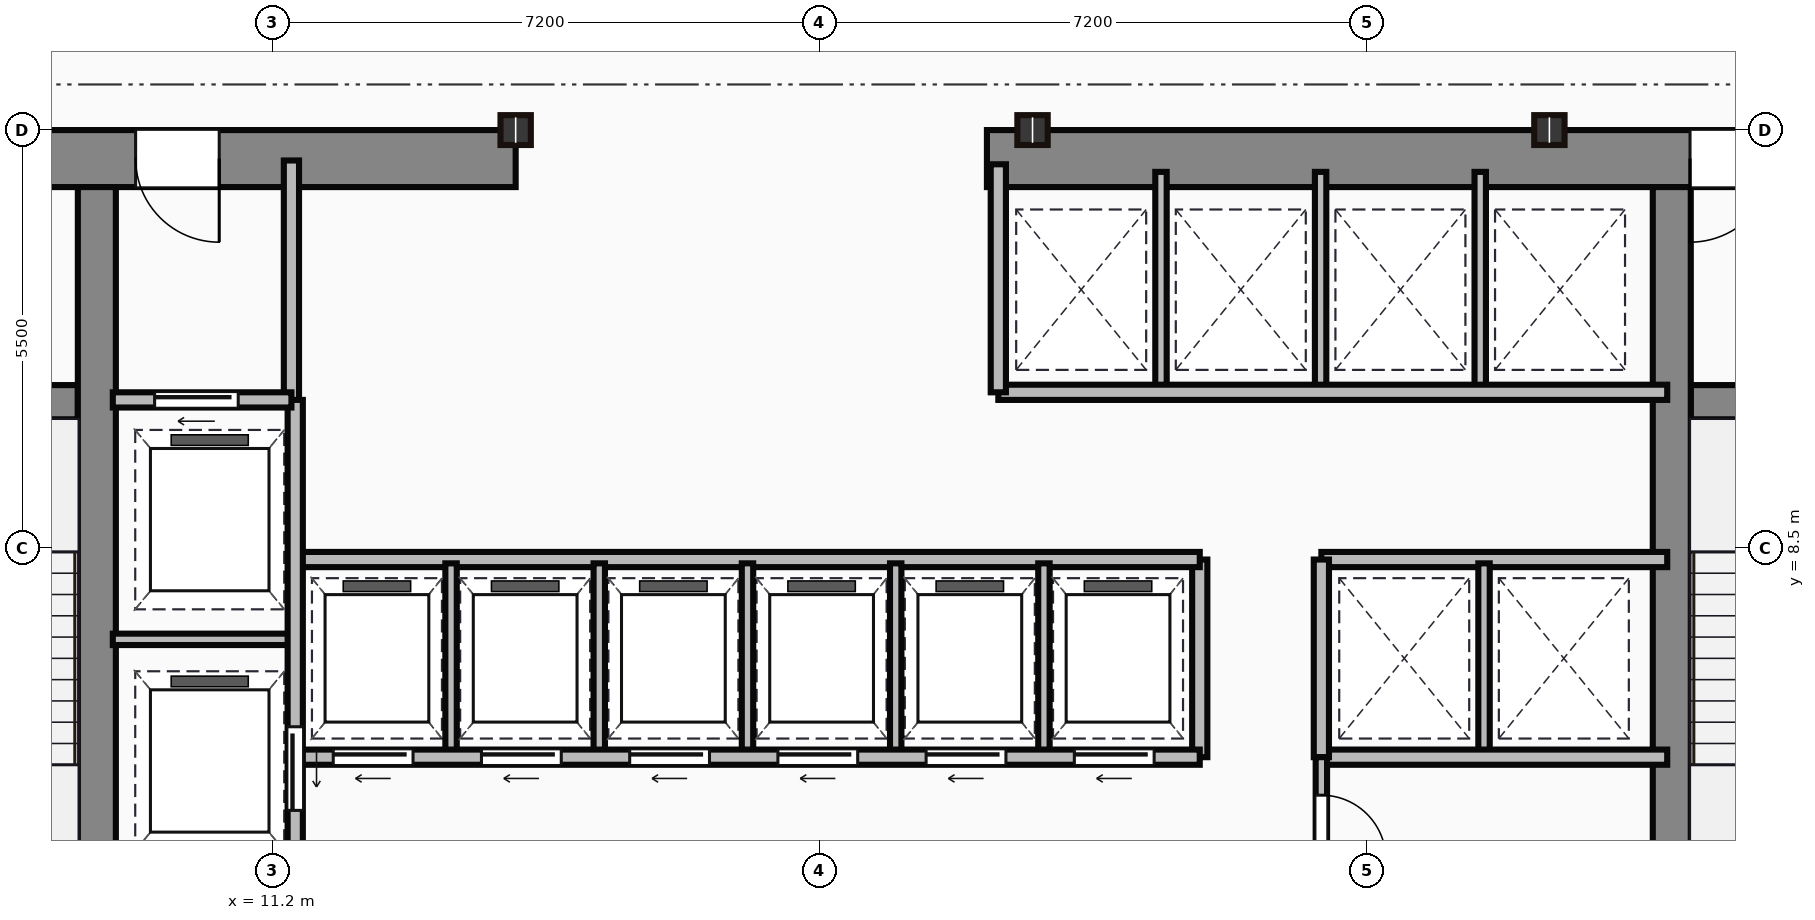
"""IFC4 building model, lengths in metres.
Left out: names, types, materials, properties, quantities, classifications, styles, units other than length and angle.
Written with IfcOpenShell. Run it as: python <this file> out.ifc"""

import sys

from ifc_helpers import new_model, si_unit, direction, frame, frame_2d, origin, origin_2d, place, context, subcontext, project, spatial, rectangle, i_section, extrude, source, transform, mapped, element, fill, save


model = new_model("IFC4")
c1 = context("Model", 3, precision=1e-05, world=origin(), true_north=direction((0.0, 1.0)))
c2 = subcontext(c1, "Body", "Model", "MODEL_VIEW")
j1 = project(units=[si_unit("LENGTHUNIT", "METRE"), si_unit("PLANEANGLEUNIT", "RADIAN")], contexts=[c1])
p1 = place(None, origin())
s1 = spatial("IfcSite", under=j1, at=p1, CompositionType="ELEMENT")
p2 = place(p1, origin())
s2 = spatial("IfcBuilding", under=s1, at=p2, CompositionType="ELEMENT")
p3 = place(p2, frame((0.0, 0.0, 132.45)))
s3 = spatial("IfcBuildingStorey", under=s2, at=p3, CompositionType="ELEMENT", Elevation=132.45)
m1 = source(origin(), c2, "Body", "SweptSolid", [
    extrude(rectangle(XDim=9.1, YDim=0.75, at=frame_2d((4.55, 0.0))), origin(), (0.0, 0.0, 1.0), 3.65),
])
p4 = place(p3, frame((5.3, 13.625, 0.0), z_axis=(0.0, 0.0, 1.0), x_axis=(1.0, 0.0, 0.0)))
e1 = element("IfcWall", 1, at=p4, inside=s3, PredefinedType="SHEAR", context=c2, shape_type="MappedRepresentation", body=[
    mapped(m1, transform((0.0, 0.0, 0.0))),
])
p5 = place(p4, frame((4.1, 0.0, 0.0)))
e2 = element("IfcOpeningElement", 2, at=p5, cuts=e1, PredefinedType="OPENING", context=c2, shape_type="SweptSolid", body=[
    extrude(rectangle(XDim=1.1, YDim=2.15, at=frame_2d((0.55, 1.075))), frame((0.0, 0.385, 0.0), z_axis=(0.0, -1.0, 0.0), x_axis=(1.0, 0.0, 0.0)), (0.0, 0.0, 1.0), 0.77),
])
m2 = source(origin(), c2, "Body", "SweptSolid", [
    extrude(rectangle(XDim=12.6, YDim=0.75, at=frame_2d((6.3, 0.0))), origin(), (0.0, 0.0, 1.0), 3.65),
])
p6 = place(p3, frame((20.6, 13.625, 0.0), z_axis=(0.0, 0.0, 1.0), x_axis=(1.0, 0.0, 0.0)))
e3 = element("IfcWall", 3, at=p6, inside=s3, PredefinedType="SHEAR", context=c2, shape_type="MappedRepresentation", body=[
    mapped(m2, transform((0.0, 0.0, 0.0))),
])
p7 = place(p6, frame((9.25, 0.0, 0.0)))
e4 = element("IfcOpeningElement", 4, at=p7, cuts=e3, PredefinedType="OPENING", context=c2, shape_type="SweptSolid", body=[
    extrude(rectangle(XDim=1.1, YDim=2.15, at=frame_2d((0.55, 1.075))), frame((0.0, 0.385, 0.0), z_axis=(0.0, -1.0, 0.0), x_axis=(1.0, 0.0, 0.0)), (0.0, 0.0, 1.0), 0.77),
])
m3 = source(origin(), c2, "Body", "SweptSolid", [
    extrude(rectangle(XDim=12.35, YDim=0.5, at=frame_2d((6.175, 0.0))), origin(), (0.0, 0.0, 1.0), 3.65),
])
for number, where, z_axis, x_axis in (
    (5, (8.89, 0.9, 0.0), (0.0, 0.0, 1.0), (0.0, 1.0, 0.0)),
    (6, (29.61, 0.9, 0.0), (0.0, 0.0, 1.0), (0.0, 1.0, 0.0)),
):
    element("IfcWall", number, at=place(p3, frame(where, z_axis=z_axis, x_axis=x_axis)), inside=s3, PredefinedType="SHEAR", context=c2, shape_type="MappedRepresentation", body=[
        mapped(m3, transform((0.0, 0.0, 0.0))),
    ])
m4 = source(origin(), c2, "Body", "SweptSolid", [
    extrude(rectangle(XDim=3.39, YDim=0.45, at=frame_2d((1.695, 0.0))), origin(), (0.0, 0.0, 1.0), 3.65),
])
p8 = place(p3, frame((5.25, 10.42, 0.0), z_axis=(0.0, 0.0, 1.0), x_axis=(1.0, 0.0, 0.0)))
e7 = element("IfcWall", 7, at=p8, inside=s3, PredefinedType="SHEAR", context=c2, shape_type="MappedRepresentation", body=[
    mapped(m4, transform((0.0, 0.0, 0.0))),
])
p9 = place(p8, frame((1.05, 0.0, 0.0)))
e8 = element("IfcOpeningElement", 8, at=p9, cuts=e7, PredefinedType="OPENING", context=c2, shape_type="SweptSolid", body=[
    extrude(rectangle(XDim=1.1, YDim=2.15, at=frame_2d((0.55, 1.075))), frame((0.0, 0.235, 0.0), z_axis=(0.0, -1.0, 0.0), x_axis=(1.0, 0.0, 0.0)), (0.0, 0.0, 1.0), 0.47),
])
p10 = place(p3, frame((29.86, 10.42, 0.0), z_axis=(0.0, 0.0, 1.0), x_axis=(1.0, 0.0, 0.0)))
e9 = element("IfcWall", 9, at=p10, inside=s3, PredefinedType="SHEAR", context=c2, shape_type="MappedRepresentation", body=[
    mapped(m4, transform((0.0, 0.0, 0.0))),
])
p11 = place(p10, frame((1.1, 0.0, 0.0)))
e10 = element("IfcOpeningElement", 10, at=p11, cuts=e9, PredefinedType="OPENING", context=c2, shape_type="SweptSolid", body=[
    extrude(rectangle(XDim=1.1, YDim=2.15, at=frame_2d((0.55, 1.075))), frame((0.0, 0.235, 0.0), z_axis=(0.0, -1.0, 0.0), x_axis=(1.0, 0.0, 0.0)), (0.0, 0.0, 1.0), 0.47),
])
m5 = source(origin(), c2, "Body", "SweptSolid", [
    extrude(i_section(OverallWidth=0.399, OverallDepth=0.393, WebThickness=0.023, FlangeThickness=0.037, at=origin_2d()), origin(), (0.0, 0.0, 1.0), 3.65),
])
for number, where, z_axis, x_axis in (
    (11, (14.4, 14.0, 0.0), (0.0, 0.0, 1.0), (1.0, 0.0, 0.0)),
    (12, (21.2, 14.0, 0.0), (0.0, 0.0, 1.0), (1.0, 0.0, 0.0)),
    (13, (28.0, 14.0, 0.0), (0.0, 0.0, 1.0), (1.0, 0.0, 0.0)),
):
    element("IfcColumn", number, at=place(p3, frame(where, z_axis=z_axis, x_axis=x_axis)), inside=s3, PredefinedType="COLUMN", context=c2, shape_type="MappedRepresentation", body=[
        mapped(m5, transform((0.0, 0.0, 0.0))),
    ])
m6 = source(origin(), c2, "Body", "SweptSolid", [
    extrude(rectangle(XDim=3.18, YDim=0.2, at=frame_2d((1.59, 0.0))), origin(), (0.0, 0.0, 1.0), 3.35),
])
p12 = place(p3, frame((11.45, 10.42, 0.0), z_axis=(0.0, 0.0, 1.0), x_axis=(0.0, 1.0, 0.0)))
e14 = element("IfcWall", 14, at=p12, inside=s3, PredefinedType="PARTITIONING", context=c2, shape_type="MappedRepresentation", body=[
    mapped(m6, transform((0.0, 0.0, 0.0))),
])
m7 = source(origin(), c2, "Body", "SweptSolid", [
    extrude(rectangle(XDim=2.35, YDim=0.2, at=frame_2d((1.175, 0.0))), origin(), (0.0, 0.0, 1.0), 3.35),
])
p13 = place(p3, frame((9.1, 10.45, 0.0), z_axis=(0.0, 0.0, 1.0), x_axis=(1.0, 0.0, 0.0)))
e15 = element("IfcWall", 15, at=p13, inside=s3, PredefinedType="PARTITIONING", context=c2, shape_type="MappedRepresentation", body=[
    mapped(m7, transform((0.0, 0.0, 0.0))),
])
p14 = place(p13, frame((0.55, 0.0, 0.0)))
e16 = element("IfcOpeningElement", 16, at=p14, cuts=e15, PredefinedType="OPENING", context=c2, shape_type="SweptSolid", body=[
    extrude(rectangle(XDim=1.1, YDim=2.15, at=frame_2d((0.55, 1.075))), frame((0.0, 0.11, 0.0), z_axis=(0.0, -1.0, 0.0), x_axis=(1.0, 0.0, 0.0)), (0.0, 0.0, 1.0), 0.22),
])
m8 = source(origin(), c2, "Body", "SweptSolid", [
    extrude(rectangle(XDim=9.6, YDim=0.2, at=frame_2d((4.8, 0.0))), origin(), (0.0, 0.0, 1.0), 3.35),
])
p15 = place(p3, frame((11.5, 0.85, 0.0), z_axis=(0.0, 0.0, 1.0), x_axis=(0.0, 1.0, 0.0)))
e17 = element("IfcWall", 17, at=p15, inside=s3, PredefinedType="PARTITIONING", context=c2, shape_type="MappedRepresentation", body=[
    mapped(m8, transform((0.0, 0.0, 0.0))),
])
p16 = place(p15, frame((4.2, 0.0, 0.0)))
e18 = element("IfcOpeningElement", 18, at=p16, cuts=e17, PredefinedType="OPENING", context=c2, shape_type="SweptSolid", body=[
    extrude(rectangle(XDim=1.1, YDim=2.15, at=frame_2d((0.55, 1.075))), frame((0.0, 0.11, 0.0), z_axis=(0.0, -1.0, 0.0), x_axis=(1.0, 0.0, 0.0)), (0.0, 0.0, 1.0), 0.22),
])
p17 = place(p15, frame((0.9, 0.0, 0.0)))
e19 = element("IfcOpeningElement", 19, at=p17, cuts=e17, PredefinedType="OPENING", context=c2, shape_type="SweptSolid", body=[
    extrude(rectangle(XDim=1.2, YDim=2.15, at=frame_2d((0.6, 1.075))), frame((0.0, 0.11, 0.0), z_axis=(0.0, -1.0, 0.0), x_axis=(1.0, 0.0, 0.0)), (0.0, 0.0, 1.0), 0.22),
])
m9 = source(origin(), c2, "Body", "SweptSolid", [
    extrude(rectangle(XDim=2.4, YDim=0.15, at=frame_2d((1.2, 0.0))), origin(), (0.0, 0.0, 1.0), 3.35),
])
p18 = place(p3, frame((9.1, 7.3, 0.0), z_axis=(0.0, 0.0, 1.0), x_axis=(1.0, 0.0, 0.0)))
e20 = element("IfcWall", 20, at=p18, inside=s3, PredefinedType="PARTITIONING", context=c2, shape_type="MappedRepresentation", body=[
    mapped(m9, transform((0.0, 0.0, 0.0))),
])
m10 = source(origin(), c2, "Body", "SweptSolid", [
    extrude(rectangle(XDim=11.85, YDim=0.2, at=frame_2d((5.925, 0.0))), origin(), (0.0, 0.0, 1.0), 3.35),
])
p19 = place(p3, frame((11.55, 5.75, 0.0), z_axis=(0.0, 0.0, 1.0), x_axis=(1.0, 0.0, 0.0)))
e21 = element("IfcWall", 21, at=p19, inside=s3, PredefinedType="PARTITIONING", context=c2, shape_type="MappedRepresentation", body=[
    mapped(m10, transform((0.0, 0.0, 0.0))),
])
p20 = place(p19, frame((0.45, 0.0, 0.0)))
e22 = element("IfcOpeningElement", 22, at=p20, cuts=e21, PredefinedType="OPENING", context=c2, shape_type="SweptSolid", body=[
    extrude(rectangle(XDim=1.05, YDim=2.15, at=frame_2d((0.525, 1.075))), frame((0.0, 0.11, 0.0), z_axis=(0.0, -1.0, 0.0), x_axis=(1.0, 0.0, 0.0)), (0.0, 0.0, 1.0), 0.22),
])
p21 = place(p19, frame((2.4, 0.0, 0.0)))
e23 = element("IfcOpeningElement", 23, at=p21, cuts=e21, PredefinedType="OPENING", context=c2, shape_type="SweptSolid", body=[
    extrude(rectangle(XDim=1.05, YDim=2.15, at=frame_2d((0.525, 1.075))), frame((0.0, 0.11, 0.0), z_axis=(0.0, -1.0, 0.0), x_axis=(1.0, 0.0, 0.0)), (0.0, 0.0, 1.0), 0.22),
])
p22 = place(p19, frame((4.35, 0.0, 0.0)))
e24 = element("IfcOpeningElement", 24, at=p22, cuts=e21, PredefinedType="OPENING", context=c2, shape_type="SweptSolid", body=[
    extrude(rectangle(XDim=1.05, YDim=2.15, at=frame_2d((0.525, 1.075))), frame((0.0, 0.11, 0.0), z_axis=(0.0, -1.0, 0.0), x_axis=(1.0, 0.0, 0.0)), (0.0, 0.0, 1.0), 0.22),
])
p23 = place(p19, frame((6.3, 0.0, 0.0)))
e25 = element("IfcOpeningElement", 25, at=p23, cuts=e21, PredefinedType="OPENING", context=c2, shape_type="SweptSolid", body=[
    extrude(rectangle(XDim=1.05, YDim=2.15, at=frame_2d((0.525, 1.075))), frame((0.0, 0.11, 0.0), z_axis=(0.0, -1.0, 0.0), x_axis=(1.0, 0.0, 0.0)), (0.0, 0.0, 1.0), 0.22),
])
p24 = place(p19, frame((8.25, 0.0, 0.0)))
e26 = element("IfcOpeningElement", 26, at=p24, cuts=e21, PredefinedType="OPENING", context=c2, shape_type="SweptSolid", body=[
    extrude(rectangle(XDim=1.05, YDim=2.15, at=frame_2d((0.525, 1.075))), frame((0.0, 0.11, 0.0), z_axis=(0.0, -1.0, 0.0), x_axis=(1.0, 0.0, 0.0)), (0.0, 0.0, 1.0), 0.22),
])
p25 = place(p19, frame((10.2, 0.0, 0.0)))
e27 = element("IfcOpeningElement", 27, at=p25, cuts=e21, PredefinedType="OPENING", context=c2, shape_type="SweptSolid", body=[
    extrude(rectangle(XDim=1.05, YDim=2.15, at=frame_2d((0.525, 1.075))), frame((0.0, 0.11, 0.0), z_axis=(0.0, -1.0, 0.0), x_axis=(1.0, 0.0, 0.0)), (0.0, 0.0, 1.0), 0.22),
])
p26 = place(p3, frame((11.55, 8.35, 0.0), z_axis=(0.0, 0.0, 1.0), x_axis=(1.0, 0.0, 0.0)))
e28 = element("IfcWall", 28, at=p26, inside=s3, PredefinedType="PARTITIONING", context=c2, shape_type="MappedRepresentation", body=[
    mapped(m10, transform((0.0, 0.0, 0.0))),
])
m11 = source(origin(), c2, "Body", "SweptSolid", [
    extrude(rectangle(XDim=2.6, YDim=0.2, at=frame_2d((1.3, 0.0))), origin(), (0.0, 0.0, 1.0), 3.35),
])
p27 = place(p3, frame((23.4, 5.75, 0.0), z_axis=(0.0, 0.0, 1.0), x_axis=(0.0, 1.0, 0.0)))
e29 = element("IfcWall", 29, at=p27, inside=s3, PredefinedType="PARTITIONING", context=c2, shape_type="MappedRepresentation", body=[
    mapped(m11, transform((0.0, 0.0, 0.0))),
])
m12 = source(origin(), c2, "Body", "SweptSolid", [
    extrude(rectangle(XDim=2.5, YDim=0.15, at=frame_2d((1.25, 0.0))), origin(), (0.0, 0.0, 1.0), 3.35),
])
for number, where, z_axis, x_axis in (
    (30, (13.55, 5.8, 0.0), (0.0, 0.0, 1.0), (0.0, 1.0, 0.0)),
    (31, (15.5, 5.8, 0.0), (0.0, 0.0, 1.0), (0.0, 1.0, 0.0)),
    (32, (17.45, 5.8, 0.0), (0.0, 0.0, 1.0), (0.0, 1.0, 0.0)),
    (33, (19.4, 5.8, 0.0), (0.0, 0.0, 1.0), (0.0, 1.0, 0.0)),
    (34, (21.35, 5.8, 0.0), (0.0, 0.0, 1.0), (0.0, 1.0, 0.0)),
):
    element("IfcWall", number, at=place(p3, frame(where, z_axis=z_axis, x_axis=x_axis)), inside=s3, PredefinedType="PARTITIONING", context=c2, shape_type="MappedRepresentation", body=[
        mapped(m12, transform((0.0, 0.0, 0.0))),
    ])
m13 = source(origin(), c2, "Body", "SweptSolid", [
    extrude(rectangle(XDim=8.8, YDim=0.2, at=frame_2d((4.4, 0.0))), origin(), (0.0, 0.0, 1.0), 3.35),
])
p28 = place(p3, frame((20.75, 10.55, 0.0), z_axis=(0.0, 0.0, 1.0), x_axis=(1.0, 0.0, 0.0)))
e35 = element("IfcWall", 35, at=p28, inside=s3, PredefinedType="PARTITIONING", context=c2, shape_type="MappedRepresentation", body=[
    mapped(m13, transform((0.0, 0.0, 0.0))),
])
m14 = source(origin(), c2, "Body", "SweptSolid", [
    extrude(rectangle(XDim=3.0, YDim=0.2, at=frame_2d((1.5, 0.0))), origin(), (0.0, 0.0, 1.0), 3.35),
])
p29 = place(p3, frame((20.75, 10.55, 0.0), z_axis=(0.0, 0.0, 1.0), x_axis=(0.0, 1.0, 0.0)))
e36 = element("IfcWall", 36, at=p29, inside=s3, PredefinedType="PARTITIONING", context=c2, shape_type="MappedRepresentation", body=[
    mapped(m14, transform((0.0, 0.0, 0.0))),
])
m15 = source(origin(), c2, "Body", "SweptSolid", [
    extrude(rectangle(XDim=2.85, YDim=0.15, at=frame_2d((1.425, 0.0))), origin(), (0.0, 0.0, 1.0), 3.35),
])
for number, where, z_axis, x_axis in (
    (37, (22.89, 10.6, 0.0), (0.0, 0.0, 1.0), (0.0, 1.0, 0.0)),
    (38, (24.99, 10.6, 0.0), (0.0, 0.0, 1.0), (0.0, 1.0, 0.0)),
    (39, (27.09, 10.6, 0.0), (0.0, 0.0, 1.0), (0.0, 1.0, 0.0)),
):
    element("IfcWall", number, at=place(p3, frame(where, z_axis=z_axis, x_axis=x_axis)), inside=s3, PredefinedType="PARTITIONING", context=c2, shape_type="MappedRepresentation", body=[
        mapped(m15, transform((0.0, 0.0, 0.0))),
    ])
m16 = source(origin(), c2, "Body", "SweptSolid", [
    extrude(rectangle(XDim=4.55, YDim=0.2, at=frame_2d((2.275, 0.0))), origin(), (0.0, 0.0, 1.0), 3.35),
])
for number, where, z_axis, x_axis in (
    (40, (25.0, 8.35, 0.0), (0.0, 0.0, 1.0), (1.0, 0.0, 0.0)),
    (41, (25.0, 5.75, 0.0), (0.0, 0.0, 1.0), (1.0, 0.0, 0.0)),
):
    element("IfcWall", number, at=place(p3, frame(where, z_axis=z_axis, x_axis=x_axis)), inside=s3, PredefinedType="PARTITIONING", context=c2, shape_type="MappedRepresentation", body=[
        mapped(m16, transform((0.0, 0.0, 0.0))),
    ])
p30 = place(p3, frame((25.0, 5.75, 0.0), z_axis=(0.0, 0.0, 1.0), x_axis=(0.0, 1.0, 0.0)))
e42 = element("IfcWall", 42, at=p30, inside=s3, PredefinedType="PARTITIONING", context=c2, shape_type="MappedRepresentation", body=[
    mapped(m11, transform((0.0, 0.0, 0.0))),
])
p31 = place(p3, frame((27.14, 5.8, 0.0), z_axis=(0.0, 0.0, 1.0), x_axis=(0.0, 1.0, 0.0)))
e43 = element("IfcWall", 43, at=p31, inside=s3, PredefinedType="PARTITIONING", context=c2, shape_type="MappedRepresentation", body=[
    mapped(m12, transform((0.0, 0.0, 0.0))),
])
m17 = source(origin(), c2, "Body", "SweptSolid", [
    extrude(rectangle(XDim=4.9, YDim=0.15, at=frame_2d((2.45, 0.0))), origin(), (0.0, 0.0, 1.0), 3.35),
])
p32 = place(p3, frame((25.0, 0.85, 0.0), z_axis=(0.0, 0.0, 1.0), x_axis=(0.0, 1.0, 0.0)))
e44 = element("IfcWall", 44, at=p32, inside=s3, PredefinedType="PARTITIONING", context=c2, shape_type="MappedRepresentation", body=[
    mapped(m17, transform((0.0, 0.0, 0.0))),
])
p33 = place(p32, frame((1.85, 0.0, 0.0)))
e45 = element("IfcOpeningElement", 45, at=p33, cuts=e44, PredefinedType="OPENING", context=c2, shape_type="SweptSolid", body=[
    extrude(rectangle(XDim=0.95, YDim=2.15, at=frame_2d((0.475, 1.075))), frame((0.0, 0.085, 0.0), z_axis=(0.0, -1.0, 0.0), x_axis=(1.0, 0.0, 0.0)), (0.0, 0.0, 1.0), 0.17),
])
p34 = place(p32, frame((3.55, 0.0, 0.0)))
e46 = element("IfcOpeningElement", 46, at=p34, cuts=e44, PredefinedType="OPENING", context=c2, shape_type="SweptSolid", body=[
    extrude(rectangle(XDim=0.85, YDim=2.15, at=frame_2d((0.425, 1.075))), frame((0.0, 0.085, 0.0), z_axis=(0.0, -1.0, 0.0), x_axis=(1.0, 0.0, 0.0)), (0.0, 0.0, 1.0), 0.17),
])
m18 = source(origin(), c2, "Body", "SweptSolid", [
    extrude(rectangle(XDim=1.1, YDim=2.15, at=frame_2d((0.55, 1.075))), frame((0.0, 0.025, 0.0), z_axis=(0.0, -1.0, 0.0), x_axis=(1.0, 0.0, 0.0)), (0.0, 0.0, 1.0), 0.05),
])
p35 = place(p5, origin())
e47 = element("IfcDoor", 47, at=p35, inside=s3, OperationType="SINGLE_SWING_RIGHT", PredefinedType="DOOR", context=c2, shape_type="MappedRepresentation", body=[
    mapped(m18, transform((0.0, 0.0, 0.0))),
])
fill(e2, e47)
p36 = place(p7, origin())
e48 = element("IfcDoor", 48, at=p36, inside=s3, OperationType="SINGLE_SWING_LEFT", PredefinedType="DOOR", context=c2, shape_type="MappedRepresentation", body=[
    mapped(m18, transform((0.0, 0.0, 0.0))),
])
fill(e4, e48)
p37 = place(p14, origin())
e49 = element("IfcDoor", 49, at=p37, inside=s3, OperationType="SLIDING_TO_LEFT", PredefinedType="DOOR", context=c2, shape_type="MappedRepresentation", body=[
    mapped(m18, transform((0.0, 0.0, 0.0))),
])
fill(e16, e49)
p38 = place(p16, frame((1.1, 0.0, 0.0), z_axis=(0.0, 0.0, 1.0), x_axis=(-1.0, 0.0, 0.0)))
e50 = element("IfcDoor", 50, at=p38, inside=s3, OperationType="SLIDING_TO_LEFT", PredefinedType="DOOR", context=c2, shape_type="MappedRepresentation", body=[
    mapped(m18, transform((0.0, 0.0, 0.0))),
])
fill(e18, e50)
m19 = source(origin(), c2, "Body", "SweptSolid", [
    extrude(rectangle(XDim=1.05, YDim=2.15, at=frame_2d((0.525, 1.075))), frame((0.0, 0.025, 0.0), z_axis=(0.0, -1.0, 0.0), x_axis=(1.0, 0.0, 0.0)), (0.0, 0.0, 1.0), 0.05),
])
p39 = place(p20, frame((1.05, 0.0, 0.0), z_axis=(0.0, 0.0, 1.0), x_axis=(-1.0, 0.0, 0.0)))
e51 = element("IfcDoor", 51, at=p39, inside=s3, OperationType="SLIDING_TO_LEFT", PredefinedType="DOOR", context=c2, shape_type="MappedRepresentation", body=[
    mapped(m19, transform((0.0, 0.0, 0.0))),
])
fill(e22, e51)
p40 = place(p21, frame((1.05, 0.0, 0.0), z_axis=(0.0, 0.0, 1.0), x_axis=(-1.0, 0.0, 0.0)))
e52 = element("IfcDoor", 52, at=p40, inside=s3, OperationType="SLIDING_TO_LEFT", PredefinedType="DOOR", context=c2, shape_type="MappedRepresentation", body=[
    mapped(m19, transform((0.0, 0.0, 0.0))),
])
fill(e23, e52)
p41 = place(p22, frame((1.05, 0.0, 0.0), z_axis=(0.0, 0.0, 1.0), x_axis=(-1.0, 0.0, 0.0)))
e53 = element("IfcDoor", 53, at=p41, inside=s3, OperationType="SLIDING_TO_LEFT", PredefinedType="DOOR", context=c2, shape_type="MappedRepresentation", body=[
    mapped(m19, transform((0.0, 0.0, 0.0))),
])
fill(e24, e53)
p42 = place(p23, frame((1.05, 0.0, 0.0), z_axis=(0.0, 0.0, 1.0), x_axis=(-1.0, 0.0, 0.0)))
e54 = element("IfcDoor", 54, at=p42, inside=s3, OperationType="SLIDING_TO_LEFT", PredefinedType="DOOR", context=c2, shape_type="MappedRepresentation", body=[
    mapped(m19, transform((0.0, 0.0, 0.0))),
])
fill(e25, e54)
p43 = place(p24, frame((1.05, 0.0, 0.0), z_axis=(0.0, 0.0, 1.0), x_axis=(-1.0, 0.0, 0.0)))
e55 = element("IfcDoor", 55, at=p43, inside=s3, OperationType="SLIDING_TO_LEFT", PredefinedType="DOOR", context=c2, shape_type="MappedRepresentation", body=[
    mapped(m19, transform((0.0, 0.0, 0.0))),
])
fill(e26, e55)
p44 = place(p25, frame((1.05, 0.0, 0.0), z_axis=(0.0, 0.0, 1.0), x_axis=(-1.0, 0.0, 0.0)))
e56 = element("IfcDoor", 56, at=p44, inside=s3, OperationType="SLIDING_TO_LEFT", PredefinedType="DOOR", context=c2, shape_type="MappedRepresentation", body=[
    mapped(m19, transform((0.0, 0.0, 0.0))),
])
fill(e27, e56)
m20 = source(origin(), c2, "Body", "SweptSolid", [
    extrude(rectangle(XDim=0.85, YDim=2.15, at=frame_2d((0.425, 1.075))), frame((0.0, 0.025, 0.0), z_axis=(0.0, -1.0, 0.0), x_axis=(1.0, 0.0, 0.0)), (0.0, 0.0, 1.0), 0.05),
])
p45 = place(p34, origin())
e57 = element("IfcDoor", 57, at=p45, inside=s3, OperationType="SINGLE_SWING_LEFT", PredefinedType="DOOR", context=c2, shape_type="MappedRepresentation", body=[
    mapped(m20, transform((0.0, 0.0, 0.0))),
])
fill(e46, e57)
save(model, sys.argv[1])
